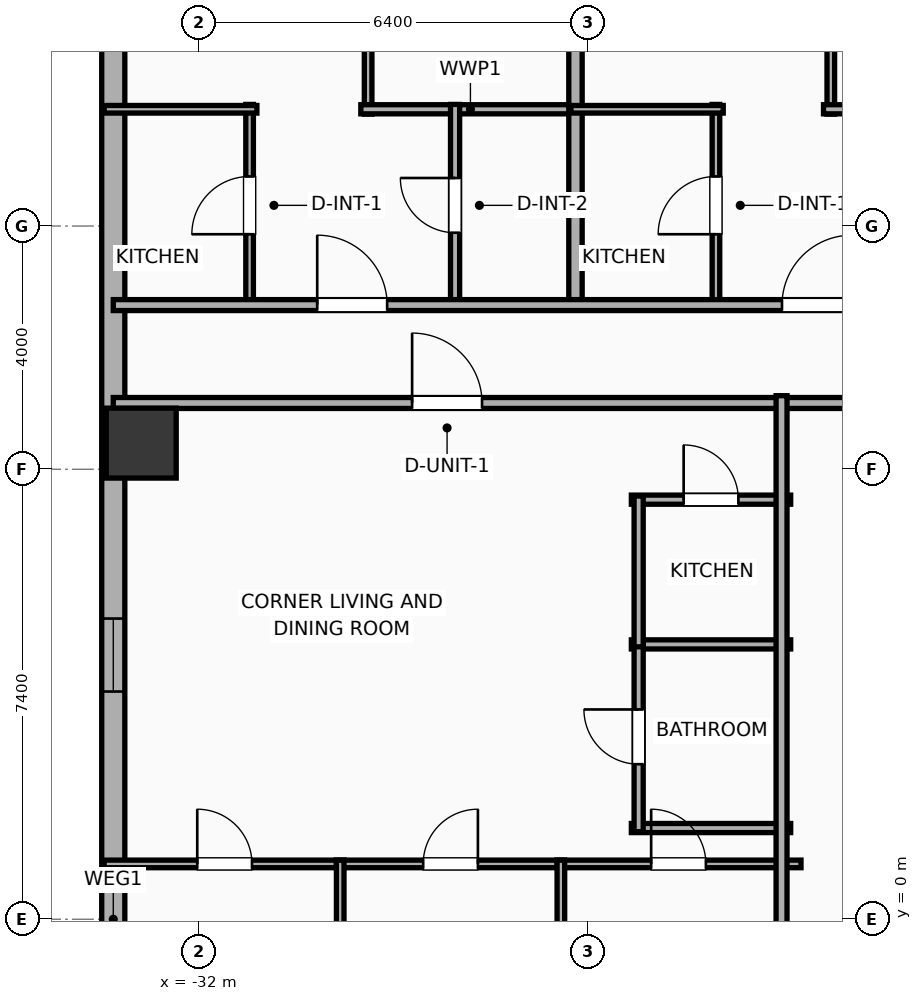
"""IFC4 building model, lengths in metres.
Left out: names, types, materials, properties, quantities, classifications, styles, units other than length and angle.
Written with IfcOpenShell. Run it as: python <this file> out.ifc"""

import sys

from ifc_helpers import new_model, si_unit, direction, frame, frame_2d, origin, origin_2d, place, context, subcontext, project, spatial, rectangle, hollow_rectangle, extrude, element, fill, save


model = new_model("IFC4")
c1 = context("Model", 3, precision=1e-05, world=origin(), true_north=direction((0.0, 1.0)))
c2 = subcontext(c1, "Body", "Model", "MODEL_VIEW")
j1 = project(units=[si_unit("LENGTHUNIT", "METRE"), si_unit("PLANEANGLEUNIT", "RADIAN")], contexts=[c1])
p1 = place(None, origin())
s1 = spatial("IfcSite", under=j1, at=p1, CompositionType="ELEMENT")
p2 = place(p1, origin())
s2 = spatial("IfcBuilding", under=s1, at=p2, CompositionType="ELEMENT")
p3 = place(p2, frame((0.0, 0.0, 41.6)))
s3 = spatial("IfcBuildingStorey", under=s2, at=p3, CompositionType="ELEMENT", Elevation=41.6)
p4 = place(p3, frame((-32.95, 7.83, 0.0), z_axis=(0.0, 0.0, 1.0), x_axis=(1.0, 0.0, 0.0)))
e1 = element("IfcColumn", 1, at=p4, inside=s3, PredefinedType="COLUMN", context=c2, shape_type="SweptSolid", body=[
    extrude(hollow_rectangle(XDim=1.15, YDim=1.15, WallThickness=0.04, at=origin_2d()), origin(), (0.0, 0.0, 1.0), 3.9),
])
p5 = place(p3, frame((-33.41, -18.381, 0.0), z_axis=(0.0, 0.0, 1.0), x_axis=(0.0, 1.0, 0.0)))
e2 = element("IfcWall", 2, at=p5, inside=s3, PredefinedType="ELEMENTEDWALL", context=c2, shape_type="SweptSolid", body=[
    extrude(rectangle(XDim=36.763, YDim=0.38, at=frame_2d((18.381, 0.0))), origin(), (0.0, 0.0, 1.0), 3.65),
])
p6 = place(p5, frame((33.187, 0.0, 0.75)))
e3 = element("IfcOpeningElement", 3, at=p6, cuts=e2, PredefinedType="OPENING", context=c2, shape_type="SweptSolid", body=[
    extrude(rectangle(XDim=1.2, YDim=2.05, at=frame_2d((0.6, 1.025))), frame((0.0, 0.2, 0.0), z_axis=(0.0, -1.0, 0.0), x_axis=(1.0, 0.0, 0.0)), (0.0, 0.0, 1.0), 0.4),
])
p7 = place(p5, frame((22.126, 0.0, 0.75)))
e4 = element("IfcOpeningElement", 4, at=p7, cuts=e2, PredefinedType="OPENING", context=c2, shape_type="SweptSolid", body=[
    extrude(rectangle(XDim=1.2, YDim=2.05, at=frame_2d((0.6, 1.025))), frame((0.0, 0.2, 0.0), z_axis=(0.0, -1.0, 0.0), x_axis=(1.0, 0.0, 0.0)), (0.0, 0.0, 1.0), 0.4),
])
p8 = place(p5, frame((13.576, 0.0, 0.75)))
e5 = element("IfcOpeningElement", 5, at=p8, cuts=e2, PredefinedType="OPENING", context=c2, shape_type="SweptSolid", body=[
    extrude(rectangle(XDim=1.2, YDim=2.05, at=frame_2d((0.6, 1.025))), frame((0.0, 0.2, 0.0), z_axis=(0.0, -1.0, 0.0), x_axis=(1.0, 0.0, 0.0)), (0.0, 0.0, 1.0), 0.4),
])
p9 = place(p3, frame((-33.41, 8.49, 0.0), z_axis=(0.0, 0.0, 1.0), x_axis=(1.0, 0.0, 0.0)))
e6 = element("IfcWall", 6, at=p9, inside=s3, PredefinedType="PARTITIONING", context=c2, shape_type="SweptSolid", body=[
    extrude(rectangle(XDim=23.53, YDim=0.18, at=frame_2d((11.765, 0.0))), origin(), (0.0, 0.0, 1.0), 3.65),
])
p10 = place(p9, frame((4.915, 0.0, 0.0)))
e7 = element("IfcOpeningElement", 7, at=p10, cuts=e6, PredefinedType="OPENING", context=c2, shape_type="SweptSolid", body=[
    extrude(rectangle(XDim=1.15, YDim=2.05, at=frame_2d((0.575, 1.025))), frame((0.0, 0.1, 0.0), z_axis=(0.0, -1.0, 0.0), x_axis=(1.0, 0.0, 0.0)), (0.0, 0.0, 1.0), 0.2),
])
p11 = place(p3, frame((-29.219, 13.24, 0.0), z_axis=(0.0, 0.0, 1.0), x_axis=(0.0, 1.0, 0.0)))
e8 = element("IfcWall", 8, at=p11, inside=s3, PredefinedType="PARTITIONING", context=c2, shape_type="SweptSolid", body=[
    extrude(rectangle(XDim=9.12, YDim=0.125, at=frame_2d((4.56, 0.0))), origin(), (0.0, 0.0, 1.0), 3.65),
])
p12 = place(p11, frame((1.739, 0.0, 0.0)))
e9 = element("IfcOpeningElement", 9, at=p12, cuts=e8, PredefinedType="OPENING", context=c2, shape_type="SweptSolid", body=[
    extrude(rectangle(XDim=0.9, YDim=2.05, at=frame_2d((0.45, 1.025))), frame((0.0, 0.073, 0.0), z_axis=(0.0, -1.0, 0.0), x_axis=(1.0, 0.0, 0.0)), (0.0, 0.0, 1.0), 0.145),
])
p13 = place(p3, frame((-29.339, 13.32, 0.0), z_axis=(0.0, 0.0, 1.0), x_axis=(1.0, 0.0, 0.0)))
e10 = element("IfcWall", 10, at=p13, inside=s3, PredefinedType="PLUMBINGWALL", context=c2, shape_type="SweptSolid", body=[
    extrude(rectangle(XDim=3.605, YDim=0.15, at=frame_2d((1.803, 0.0))), origin(), (0.0, 0.0, 1.0), 3.65),
])
p14 = place(p3, frame((-31.168, 10.08, 0.0), z_axis=(0.0, 0.0, 1.0), x_axis=(0.0, 1.0, 0.0)))
e11 = element("IfcWall", 11, at=p14, inside=s3, PredefinedType="PARTITIONING", context=c2, shape_type="SweptSolid", body=[
    extrude(rectangle(XDim=3.32, YDim=0.125, at=frame_2d((1.66, 0.0))), origin(), (0.0, 0.0, 1.0), 3.65),
])
p15 = place(p14, frame((1.185, 0.0, 0.0)))
e12 = element("IfcOpeningElement", 12, at=p15, cuts=e11, PredefinedType="OPENING", context=c2, shape_type="SweptSolid", body=[
    extrude(rectangle(XDim=0.95, YDim=2.05, at=frame_2d((0.475, 1.025))), frame((0.0, 0.073, 0.0), z_axis=(0.0, -1.0, 0.0), x_axis=(1.0, 0.0, 0.0)), (0.0, 0.0, 1.0), 0.145),
])
p16 = place(p3, frame((-33.56, 13.32, 0.0), z_axis=(0.0, 0.0, 1.0), x_axis=(1.0, 0.0, 0.0)))
e13 = element("IfcWall", 13, at=p16, inside=s3, PredefinedType="PARTITIONING", context=c2, shape_type="SweptSolid", body=[
    extrude(rectangle(XDim=2.512, YDim=0.125, at=frame_2d((1.256, 0.0))), origin(), (0.0, 0.0, 1.0), 3.65),
])
p17 = place(p3, frame((-27.789, 10.08, 0.0), z_axis=(0.0, 0.0, 1.0), x_axis=(0.0, 1.0, 0.0)))
e14 = element("IfcWall", 14, at=p17, inside=s3, PredefinedType="PLUMBINGWALL", context=c2, shape_type="SweptSolid", body=[
    extrude(rectangle(XDim=3.32, YDim=0.15, at=frame_2d((1.66, 0.0))), origin(), (0.0, 0.0, 1.0), 3.65),
])
p18 = place(p17, frame((1.21, 0.0, 0.0)))
e15 = element("IfcOpeningElement", 15, at=p18, cuts=e14, PredefinedType="OPENING", context=c2, shape_type="SweptSolid", body=[
    extrude(rectangle(XDim=0.9, YDim=2.05, at=frame_2d((0.45, 1.025))), frame((0.0, 0.085, 0.0), z_axis=(0.0, -1.0, 0.0), x_axis=(1.0, 0.0, 0.0)), (0.0, 0.0, 1.0), 0.17),
])
p19 = place(p3, frame((-25.809, 10.02, 0.0), z_axis=(0.0, 0.0, 1.0), x_axis=(0.0, 1.0, 0.0)))
e16 = element("IfcWall", 16, at=p19, inside=s3, PredefinedType="PARTITIONING", context=c2, shape_type="SweptSolid", body=[
    extrude(rectangle(XDim=12.19, YDim=0.22, at=frame_2d((6.095, 0.0))), origin(), (0.0, 0.0, 1.0), 3.65),
])
p20 = place(p3, frame((-21.61, 13.24, 0.0), z_axis=(0.0, 0.0, 1.0), x_axis=(0.0, 1.0, 0.0)))
e17 = element("IfcWall", 17, at=p20, inside=s3, PredefinedType="PARTITIONING", context=c2, shape_type="SweptSolid", body=[
    extrude(rectangle(XDim=9.12, YDim=0.125, at=frame_2d((4.56, 0.0))), origin(), (0.0, 0.0, 1.0), 3.65),
])
p21 = place(p20, frame((1.739, 0.0, 0.0)))
e18 = element("IfcOpeningElement", 18, at=p21, cuts=e17, PredefinedType="OPENING", context=c2, shape_type="SweptSolid", body=[
    extrude(rectangle(XDim=0.9, YDim=2.05, at=frame_2d((0.45, 1.025))), frame((0.0, 0.073, 0.0), z_axis=(0.0, -1.0, 0.0), x_axis=(1.0, 0.0, 0.0)), (0.0, 0.0, 1.0), 0.145),
])
p22 = place(p3, frame((-21.73, 13.32, 0.0), z_axis=(0.0, 0.0, 1.0), x_axis=(1.0, 0.0, 0.0)))
e19 = element("IfcWall", 19, at=p22, inside=s3, PredefinedType="PLUMBINGWALL", context=c2, shape_type="SweptSolid", body=[
    extrude(rectangle(XDim=3.605, YDim=0.15, at=frame_2d((1.802, 0.0))), origin(), (0.0, 0.0, 1.0), 3.65),
])
p23 = place(p3, frame((-23.499, 10.08, 0.0), z_axis=(0.0, 0.0, 1.0), x_axis=(0.0, 1.0, 0.0)))
e20 = element("IfcWall", 20, at=p23, inside=s3, PredefinedType="PARTITIONING", context=c2, shape_type="SweptSolid", body=[
    extrude(rectangle(XDim=3.32, YDim=0.125, at=frame_2d((1.66, 0.0))), origin(), (0.0, 0.0, 1.0), 3.65),
])
p24 = place(p23, frame((1.185, 0.0, 0.0)))
e21 = element("IfcOpeningElement", 21, at=p24, cuts=e20, PredefinedType="OPENING", context=c2, shape_type="SweptSolid", body=[
    extrude(rectangle(XDim=0.95, YDim=2.05, at=frame_2d((0.475, 1.025))), frame((0.0, 0.073, 0.0), z_axis=(0.0, -1.0, 0.0), x_axis=(1.0, 0.0, 0.0)), (0.0, 0.0, 1.0), 0.145),
])
p25 = place(p3, frame((-25.884, 13.32, 0.0), z_axis=(0.0, 0.0, 1.0), x_axis=(1.0, 0.0, 0.0)))
e22 = element("IfcWall", 22, at=p25, inside=s3, PredefinedType="PARTITIONING", context=c2, shape_type="SweptSolid", body=[
    extrude(rectangle(XDim=2.505, YDim=0.125, at=frame_2d((1.252, 0.0))), origin(), (0.0, 0.0, 1.0), 3.65),
])
p26 = place(p3, frame((-33.41, 10.1, 0.0), z_axis=(0.0, 0.0, 1.0), x_axis=(1.0, 0.0, 0.0)))
e23 = element("IfcWall", 23, at=p26, inside=s3, PredefinedType="PARTITIONING", context=c2, shape_type="SweptSolid", body=[
    extrude(rectangle(XDim=59.62, YDim=0.18, at=frame_2d((29.81, 0.0))), origin(), (0.0, 0.0, 1.0), 3.65),
])
p27 = place(p26, frame((3.354, 0.0, 0.0)))
e24 = element("IfcOpeningElement", 24, at=p27, cuts=e23, PredefinedType="OPENING", context=c2, shape_type="SweptSolid", body=[
    extrude(rectangle(XDim=1.15, YDim=2.05, at=frame_2d((0.575, 1.025))), frame((0.0, 0.1, 0.0), z_axis=(0.0, -1.0, 0.0), x_axis=(1.0, 0.0, 0.0)), (0.0, 0.0, 1.0), 0.2),
])
p28 = place(p26, frame((10.997, 0.0, 0.0)))
e25 = element("IfcOpeningElement", 25, at=p28, cuts=e23, PredefinedType="OPENING", context=c2, shape_type="SweptSolid", body=[
    extrude(rectangle(XDim=1.15, YDim=2.05, at=frame_2d((0.575, 1.025))), frame((0.0, 0.1, 0.0), z_axis=(0.0, -1.0, 0.0), x_axis=(1.0, 0.0, 0.0)), (0.0, 0.0, 1.0), 0.2),
])
p29 = place(p26, frame((20.232, 0.0, 0.0)))
e26 = element("IfcOpeningElement", 26, at=p29, cuts=e23, PredefinedType="OPENING", context=c2, shape_type="SweptSolid", body=[
    extrude(rectangle(XDim=1.15, YDim=2.05, at=frame_2d((0.575, 1.025))), frame((0.0, 0.1, 0.0), z_axis=(0.0, -1.0, 0.0), x_axis=(1.0, 0.0, 0.0)), (0.0, 0.0, 1.0), 0.2),
])
p30 = place(p26, frame((30.38, 0.0, 0.0)))
e27 = element("IfcOpeningElement", 27, at=p30, cuts=e23, PredefinedType="OPENING", context=c2, shape_type="SweptSolid", body=[
    extrude(rectangle(XDim=1.15, YDim=2.05, at=frame_2d((0.575, 1.025))), frame((0.0, 0.1, 0.0), z_axis=(0.0, -1.0, 0.0), x_axis=(1.0, 0.0, 0.0)), (0.0, 0.0, 1.0), 0.2),
])
p31 = place(p26, frame((40.998, 0.0, 0.0)))
e28 = element("IfcOpeningElement", 28, at=p31, cuts=e23, PredefinedType="OPENING", context=c2, shape_type="SweptSolid", body=[
    extrude(rectangle(XDim=1.15, YDim=2.05, at=frame_2d((0.575, 1.025))), frame((0.0, 0.1, 0.0), z_axis=(0.0, -1.0, 0.0), x_axis=(1.0, 0.0, 0.0)), (0.0, 0.0, 1.0), 0.2),
])
p32 = place(p26, frame((49.428, 0.0, 0.0)))
e29 = element("IfcOpeningElement", 29, at=p32, cuts=e23, PredefinedType="OPENING", context=c2, shape_type="SweptSolid", body=[
    extrude(rectangle(XDim=0.9, YDim=2.05, at=frame_2d((0.45, 1.025))), frame((0.0, 0.1, 0.0), z_axis=(0.0, -1.0, 0.0), x_axis=(1.0, 0.0, 0.0)), (0.0, 0.0, 1.0), 0.2),
])
p33 = place(p26, frame((56.07, 0.0, 0.0)))
e30 = element("IfcOpeningElement", 30, at=p33, cuts=e23, PredefinedType="OPENING", context=c2, shape_type="SweptSolid", body=[
    extrude(rectangle(XDim=0.9, YDim=2.05, at=frame_2d((0.45, 1.025))), frame((0.0, 0.1, 0.0), z_axis=(0.0, -1.0, 0.0), x_axis=(1.0, 0.0, 0.0)), (0.0, 0.0, 1.0), 0.2),
])
p34 = place(p3, frame((-24.89, 6.9, 0.0), z_axis=(0.0, 0.0, 1.0), x_axis=(1.0, 0.0, 0.0)))
e31 = element("IfcWall", 31, at=p34, inside=s3, PredefinedType="PLUMBINGWALL", context=c2, shape_type="SweptSolid", body=[
    extrude(rectangle(XDim=2.62, YDim=0.15, at=frame_2d((1.31, 0.0))), origin(), (0.0, 0.0, 1.0), 3.65),
])
p35 = place(p34, frame((0.86, 0.0, 0.0)))
e32 = element("IfcOpeningElement", 32, at=p35, cuts=e31, PredefinedType="OPENING", context=c2, shape_type="SweptSolid", body=[
    extrude(rectangle(XDim=0.9, YDim=2.05, at=frame_2d((0.45, 1.025))), frame((0.0, 0.085, 0.0), z_axis=(0.0, -1.0, 0.0), x_axis=(1.0, 0.0, 0.0)), (0.0, 0.0, 1.0), 0.17),
])
for number, where, z_axis, x_axis in (
    (33, (-24.89, 4.52, 0.0), (0.0, 0.0, 1.0), (1.0, 0.0, 0.0)),
    (34, (-24.89, 1.5, 0.0), (0.0, 0.0, 1.0), (1.0, 0.0, 0.0)),
):
    element("IfcWall", number, at=place(p3, frame(where, z_axis=z_axis, x_axis=x_axis)), inside=s3, PredefinedType="PLUMBINGWALL", context=c2, shape_type="SweptSolid", body=[
        extrude(rectangle(XDim=2.62, YDim=0.15, at=frame_2d((1.31, 0.0))), origin(), (0.0, 0.0, 1.0), 3.65),
    ])
p36 = place(p3, frame((-24.77, 1.44, 0.0), z_axis=(0.0, 0.0, 1.0), x_axis=(0.0, 1.0, 0.0)))
e35 = element("IfcWall", 35, at=p36, inside=s3, PredefinedType="PLUMBINGWALL", context=c2, shape_type="SweptSolid", body=[
    extrude(rectangle(XDim=3.12, YDim=0.15, at=frame_2d((1.56, 0.0))), origin(), (0.0, 0.0, 1.0), 3.65),
])
p37 = place(p36, frame((1.11, 0.0, 0.0)))
e36 = element("IfcOpeningElement", 36, at=p37, cuts=e35, PredefinedType="OPENING", context=c2, shape_type="SweptSolid", body=[
    extrude(rectangle(XDim=0.9, YDim=2.05, at=frame_2d((0.45, 1.025))), frame((0.0, 0.085, 0.0), z_axis=(0.0, -1.0, 0.0), x_axis=(1.0, 0.0, 0.0)), (0.0, 0.0, 1.0), 0.17),
])
p38 = place(p3, frame((-24.77, 4.48, 0.0), z_axis=(0.0, 0.0, 1.0), x_axis=(0.0, 1.0, 0.0)))
e37 = element("IfcWall", 37, at=p38, inside=s3, PredefinedType="PLUMBINGWALL", context=c2, shape_type="SweptSolid", body=[
    extrude(rectangle(XDim=2.48, YDim=0.15, at=frame_2d((1.24, 0.0))), origin(), (0.0, 0.0, 1.0), 3.65),
])
p39 = place(p3, frame((-33.56, 0.91, 0.0), z_axis=(0.0, 0.0, 1.0), x_axis=(1.0, 0.0, 0.0)))
e38 = element("IfcWall", 38, at=p39, inside=s3, PredefinedType="PARTITIONING", context=c2, shape_type="SweptSolid", body=[
    extrude(rectangle(XDim=3.945, YDim=0.125, at=frame_2d((1.972, 0.0))), origin(), (0.0, 0.0, 1.0), 3.65),
])
p40 = place(p39, frame((1.531, 0.0, 0.0)))
e39 = element("IfcOpeningElement", 39, at=p40, cuts=e38, PredefinedType="OPENING", context=c2, shape_type="SweptSolid", body=[
    extrude(rectangle(XDim=0.9, YDim=2.05, at=frame_2d((0.45, 1.025))), frame((0.0, 0.073, 0.0), z_axis=(0.0, -1.0, 0.0), x_axis=(1.0, 0.0, 0.0)), (0.0, 0.0, 1.0), 0.145),
])
p41 = place(p3, frame((-29.74, 0.91, 0.0), z_axis=(0.0, 0.0, 1.0), x_axis=(1.0, 0.0, 0.0)))
e40 = element("IfcWall", 40, at=p41, inside=s3, PredefinedType="PARTITIONING", context=c2, shape_type="SweptSolid", body=[
    extrude(rectangle(XDim=3.754, YDim=0.125, at=frame_2d((1.877, 0.0))), origin(), (0.0, 0.0, 1.0), 3.65),
])
p42 = place(p41, frame((1.427, 0.0, 0.0)))
e41 = element("IfcOpeningElement", 41, at=p42, cuts=e40, PredefinedType="OPENING", context=c2, shape_type="SweptSolid", body=[
    extrude(rectangle(XDim=0.9, YDim=2.05, at=frame_2d((0.45, 1.025))), frame((0.0, 0.073, 0.0), z_axis=(0.0, -1.0, 0.0), x_axis=(1.0, 0.0, 0.0)), (0.0, 0.0, 1.0), 0.145),
])
p43 = place(p3, frame((-26.112, 0.91, 0.0), z_axis=(0.0, 0.0, 1.0), x_axis=(1.0, 0.0, 0.0)))
e42 = element("IfcWall", 42, at=p43, inside=s3, PredefinedType="PARTITIONING", context=c2, shape_type="SweptSolid", body=[
    extrude(rectangle(XDim=4.011, YDim=0.125, at=frame_2d((2.006, 0.0))), origin(), (0.0, 0.0, 1.0), 3.65),
])
p44 = place(p43, frame((1.547, 0.0, 0.0)))
e43 = element("IfcOpeningElement", 43, at=p44, cuts=e42, PredefinedType="OPENING", context=c2, shape_type="SweptSolid", body=[
    extrude(rectangle(XDim=0.9, YDim=2.05, at=frame_2d((0.45, 1.025))), frame((0.0, 0.073, 0.0), z_axis=(0.0, -1.0, 0.0), x_axis=(1.0, 0.0, 0.0)), (0.0, 0.0, 1.0), 0.145),
])
for number, where, z_axis, x_axis in (
    (44, (-26.049, -8.81, 0.0), (0.0, 0.0, 1.0), (0.0, 1.0, 0.0)),
    (45, (-29.678, -8.81, 0.0), (0.0, 0.0, 1.0), (0.0, 1.0, 0.0)),
):
    element("IfcWall", number, at=place(p3, frame(where, z_axis=z_axis, x_axis=x_axis)), inside=s3, PredefinedType="PARTITIONING", context=c2, shape_type="SweptSolid", body=[
        extrude(rectangle(XDim=9.78, YDim=0.125, at=frame_2d((4.89, 0.0))), origin(), (0.0, 0.0, 1.0), 3.65),
    ])
p45 = place(p3, frame((-22.42, -8.61, 0.0), z_axis=(0.0, 0.0, 1.0), x_axis=(0.0, 1.0, 0.0)))
e46 = element("IfcWall", 46, at=p45, inside=s3, PredefinedType="PARTITIONING", context=c2, shape_type="SweptSolid", body=[
    extrude(rectangle(XDim=17.22, YDim=0.18, at=frame_2d((8.61, 0.0))), origin(), (0.0, 0.0, 1.0), 3.65),
])
p46 = place(p7, origin())
e47 = element("IfcWindow", 47, at=p46, inside=s3, PartitioningType="SINGLE_PANEL", PredefinedType="WINDOW", context=c2, shape_type="SweptSolid", body=[
    extrude(rectangle(XDim=1.2, YDim=2.05, at=frame_2d((0.6, 1.025))), frame((0.0, 0.03, 0.0), z_axis=(0.0, -1.0, 0.0), x_axis=(1.0, 0.0, 0.0)), (0.0, 0.0, 1.0), 0.06),
])
fill(e4, e47)
p47 = place(p10, origin())
e48 = element("IfcDoor", 48, at=p47, inside=s3, OperationType="SINGLE_SWING_LEFT", PredefinedType="DOOR", context=c2, shape_type="SweptSolid", body=[
    extrude(rectangle(XDim=1.15, YDim=2.05, at=frame_2d((0.575, 1.025))), frame((0.0, 0.025, 0.0), z_axis=(0.0, -1.0, 0.0), x_axis=(1.0, 0.0, 0.0)), (0.0, 0.0, 1.0), 0.05),
])
fill(e7, e48)
p48 = place(p15, origin())
e49 = element("IfcDoor", 49, at=p48, inside=s3, OperationType="SINGLE_SWING_LEFT", PredefinedType="DOOR", context=c2, shape_type="SweptSolid", body=[
    extrude(rectangle(XDim=0.95, YDim=2.05, at=frame_2d((0.475, 1.025))), frame((0.0, 0.025, 0.0), z_axis=(0.0, -1.0, 0.0), x_axis=(1.0, 0.0, 0.0)), (0.0, 0.0, 1.0), 0.05),
])
fill(e12, e49)
p49 = place(p18, origin())
e50 = element("IfcDoor", 50, at=p49, inside=s3, OperationType="SINGLE_SWING_RIGHT", PredefinedType="DOOR", context=c2, shape_type="SweptSolid", body=[
    extrude(rectangle(XDim=0.9, YDim=2.05, at=frame_2d((0.45, 1.025))), frame((0.0, 0.025, 0.0), z_axis=(0.0, -1.0, 0.0), x_axis=(1.0, 0.0, 0.0)), (0.0, 0.0, 1.0), 0.05),
])
fill(e15, e50)
p50 = place(p24, origin())
e51 = element("IfcDoor", 51, at=p50, inside=s3, OperationType="SINGLE_SWING_LEFT", PredefinedType="DOOR", context=c2, shape_type="SweptSolid", body=[
    extrude(rectangle(XDim=0.95, YDim=2.05, at=frame_2d((0.475, 1.025))), frame((0.0, 0.025, 0.0), z_axis=(0.0, -1.0, 0.0), x_axis=(1.0, 0.0, 0.0)), (0.0, 0.0, 1.0), 0.05),
])
fill(e21, e51)
p51 = place(p27, origin())
e52 = element("IfcDoor", 52, at=p51, inside=s3, OperationType="SINGLE_SWING_LEFT", PredefinedType="DOOR", context=c2, shape_type="SweptSolid", body=[
    extrude(rectangle(XDim=1.15, YDim=2.05, at=frame_2d((0.575, 1.025))), frame((0.0, 0.025, 0.0), z_axis=(0.0, -1.0, 0.0), x_axis=(1.0, 0.0, 0.0)), (0.0, 0.0, 1.0), 0.05),
])
fill(e24, e52)
p52 = place(p28, origin())
e53 = element("IfcDoor", 53, at=p52, inside=s3, OperationType="SINGLE_SWING_RIGHT", PredefinedType="DOOR", context=c2, shape_type="SweptSolid", body=[
    extrude(rectangle(XDim=1.15, YDim=2.05, at=frame_2d((0.575, 1.025))), frame((0.0, 0.025, 0.0), z_axis=(0.0, -1.0, 0.0), x_axis=(1.0, 0.0, 0.0)), (0.0, 0.0, 1.0), 0.05),
])
fill(e25, e53)
p53 = place(p35, origin())
e54 = element("IfcDoor", 54, at=p53, inside=s3, OperationType="SINGLE_SWING_LEFT", PredefinedType="DOOR", context=c2, shape_type="SweptSolid", body=[
    extrude(rectangle(XDim=0.9, YDim=2.05, at=frame_2d((0.45, 1.025))), frame((0.0, 0.025, 0.0), z_axis=(0.0, -1.0, 0.0), x_axis=(1.0, 0.0, 0.0)), (0.0, 0.0, 1.0), 0.05),
])
fill(e32, e54)
p54 = place(p37, origin())
e55 = element("IfcDoor", 55, at=p54, inside=s3, OperationType="SINGLE_SWING_RIGHT", PredefinedType="DOOR", context=c2, shape_type="SweptSolid", body=[
    extrude(rectangle(XDim=0.9, YDim=2.05, at=frame_2d((0.45, 1.025))), frame((0.0, 0.025, 0.0), z_axis=(0.0, -1.0, 0.0), x_axis=(1.0, 0.0, 0.0)), (0.0, 0.0, 1.0), 0.05),
])
fill(e36, e55)
p55 = place(p40, origin())
e56 = element("IfcDoor", 56, at=p55, inside=s3, OperationType="SINGLE_SWING_LEFT", PredefinedType="DOOR", context=c2, shape_type="SweptSolid", body=[
    extrude(rectangle(XDim=0.9, YDim=2.05, at=frame_2d((0.45, 1.025))), frame((0.0, 0.025, 0.0), z_axis=(0.0, -1.0, 0.0), x_axis=(1.0, 0.0, 0.0)), (0.0, 0.0, 1.0), 0.05),
])
fill(e39, e56)
p56 = place(p42, origin())
e57 = element("IfcDoor", 57, at=p56, inside=s3, OperationType="SINGLE_SWING_RIGHT", PredefinedType="DOOR", context=c2, shape_type="SweptSolid", body=[
    extrude(rectangle(XDim=0.9, YDim=2.05, at=frame_2d((0.45, 1.025))), frame((0.0, 0.025, 0.0), z_axis=(0.0, -1.0, 0.0), x_axis=(1.0, 0.0, 0.0)), (0.0, 0.0, 1.0), 0.05),
])
fill(e41, e57)
p57 = place(p44, origin())
e58 = element("IfcDoor", 58, at=p57, inside=s3, OperationType="SINGLE_SWING_LEFT", PredefinedType="DOOR", context=c2, shape_type="SweptSolid", body=[
    extrude(rectangle(XDim=0.9, YDim=2.05, at=frame_2d((0.45, 1.025))), frame((0.0, 0.025, 0.0), z_axis=(0.0, -1.0, 0.0), x_axis=(1.0, 0.0, 0.0)), (0.0, 0.0, 1.0), 0.05),
])
fill(e43, e58)
save(model, sys.argv[1])
